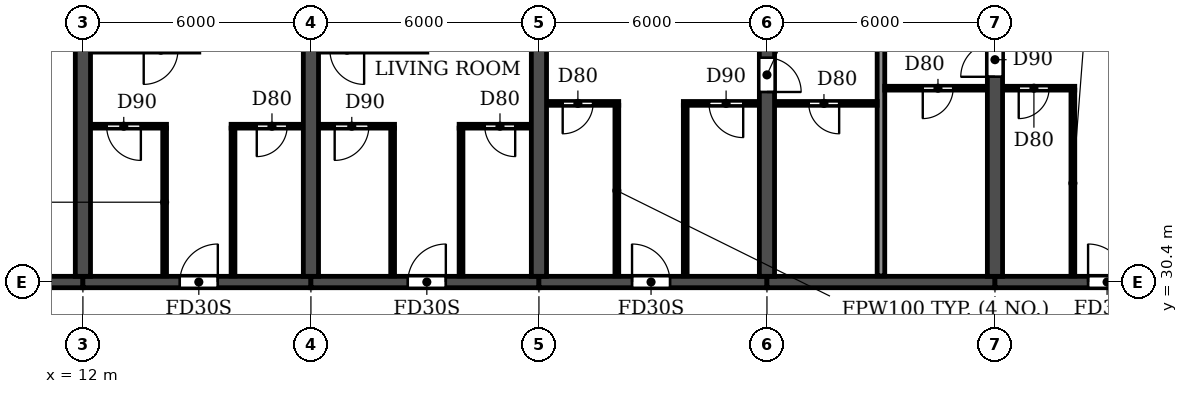
"""IFC4 building model, lengths in metres.
Left out: names, types, materials, properties, quantities, classifications, styles, units other than length and angle.
Written with IfcOpenShell. Run it as: python <this file> out.ifc"""

import sys

from ifc_helpers import new_model, si_unit, direction, frame, frame_2d, origin, place, context, subcontext, project, spatial, rectangle, extrude, element, fill, save


model = new_model("IFC4")
c1 = context("Model", 3, precision=1e-05, world=origin(), true_north=direction((0.0, 1.0)))
c2 = subcontext(c1, "Body", "Model", "MODEL_VIEW")
j1 = project(units=[si_unit("LENGTHUNIT", "METRE"), si_unit("PLANEANGLEUNIT", "RADIAN")], contexts=[c1])
p1 = place(None, origin())
s1 = spatial("IfcSite", under=j1, at=p1, CompositionType="ELEMENT")
p2 = place(p1, origin())
s2 = spatial("IfcBuilding", under=s1, at=p2, CompositionType="ELEMENT")
p3 = place(p2, frame((0.0, 0.0, 63.0)))
s3 = spatial("IfcBuildingStorey", under=s2, at=p3, CompositionType="ELEMENT", Elevation=63.0)
for number, where, z_axis, x_axis in (
    (1, (12.0, 30.55, 0.0), (0.0, 0.0, 1.0), (0.0, 1.0, 0.0)),
    (2, (18.0, 30.55, 0.0), (0.0, 0.0, 1.0), (0.0, 1.0, 0.0)),
    (3, (24.0, 30.55, 0.0), (0.0, 0.0, 1.0), (0.0, 1.0, 0.0)),
):
    element("IfcWall", number, at=place(p3, frame(where, z_axis=z_axis, x_axis=x_axis)), inside=s3, PredefinedType="SHEAR", context=c2, shape_type="SweptSolid", body=[
        extrude(rectangle(XDim=14.05, YDim=0.4, at=frame_2d((7.025, 0.0))), origin(), (0.0, 0.0, 1.0), 2.95),
    ])
p4 = place(p3, frame((30.0, 30.55, 0.0), z_axis=(0.0, 0.0, 1.0), x_axis=(0.0, 1.0, 0.0)))
e4 = element("IfcWall", 4, at=p4, inside=s3, PredefinedType="SHEAR", context=c2, shape_type="SweptSolid", body=[
    extrude(rectangle(XDim=14.05, YDim=0.4, at=frame_2d((7.025, 0.0))), origin(), (0.0, 0.0, 1.0), 2.95),
])
p5 = place(p4, frame((4.85, 0.0, 0.0)))
e5 = element("IfcOpeningElement", 5, at=p5, cuts=e4, PredefinedType="OPENING", context=c2, shape_type="SweptSolid", body=[
    extrude(rectangle(XDim=0.9, YDim=2.1, at=frame_2d((0.45, 1.05))), frame((0.0, 0.21, 0.0), z_axis=(0.0, -1.0, 0.0), x_axis=(1.0, 0.0, 0.0)), (0.0, 0.0, 1.0), 0.42),
])
p6 = place(p3, frame((36.0, 30.55, 0.0), z_axis=(0.0, 0.0, 1.0), x_axis=(0.0, 1.0, 0.0)))
e6 = element("IfcWall", 6, at=p6, inside=s3, PredefinedType="SHEAR", context=c2, shape_type="SweptSolid", body=[
    extrude(rectangle(XDim=14.05, YDim=0.4, at=frame_2d((7.025, 0.0))), origin(), (0.0, 0.0, 1.0), 2.95),
])
p7 = place(p6, frame((5.25, 0.0, 0.0)))
e7 = element("IfcOpeningElement", 7, at=p7, cuts=e6, PredefinedType="OPENING", context=c2, shape_type="SweptSolid", body=[
    extrude(rectangle(XDim=0.9, YDim=2.1, at=frame_2d((0.45, 1.05))), frame((0.0, 0.21, 0.0), z_axis=(0.0, -1.0, 0.0), x_axis=(1.0, 0.0, 0.0)), (0.0, 0.0, 1.0), 0.42),
])
p8 = place(p3, frame((6.2, 30.4, 0.0), z_axis=(0.0, 0.0, 1.0), x_axis=(1.0, 0.0, 0.0)))
e8 = element("IfcWall", 8, at=p8, inside=s3, PredefinedType="SHEAR", context=c2, shape_type="SweptSolid", body=[
    extrude(rectangle(XDim=5.8, YDim=0.3, at=frame_2d((2.9, 0.0))), origin(), (0.0, 0.0, 1.0), 2.35),
])
p9 = place(p8, frame((2.3, 0.0, 0.0)))
e9 = element("IfcOpeningElement", 9, at=p9, cuts=e8, PredefinedType="OPENING", context=c2, shape_type="SweptSolid", body=[
    extrude(rectangle(XDim=1.0, YDim=2.1, at=frame_2d((0.5, 1.05))), frame((0.0, 0.16, 0.0), z_axis=(0.0, -1.0, 0.0), x_axis=(1.0, 0.0, 0.0)), (0.0, 0.0, 1.0), 0.32),
])
p10 = place(p3, frame((12.0, 30.4, 0.0), z_axis=(0.0, 0.0, 1.0), x_axis=(1.0, 0.0, 0.0)))
e10 = element("IfcWall", 10, at=p10, inside=s3, PredefinedType="SHEAR", context=c2, shape_type="SweptSolid", body=[
    extrude(rectangle(XDim=6.0, YDim=0.3, at=frame_2d((3.0, 0.0))), origin(), (0.0, 0.0, 1.0), 2.35),
])
p11 = place(p10, frame((2.55, 0.0, 0.0)))
e11 = element("IfcOpeningElement", 11, at=p11, cuts=e10, PredefinedType="OPENING", context=c2, shape_type="SweptSolid", body=[
    extrude(rectangle(XDim=1.0, YDim=2.1, at=frame_2d((0.5, 1.05))), frame((0.0, 0.16, 0.0), z_axis=(0.0, -1.0, 0.0), x_axis=(1.0, 0.0, 0.0)), (0.0, 0.0, 1.0), 0.32),
])
p12 = place(p3, frame((18.0, 30.4, 0.0), z_axis=(0.0, 0.0, 1.0), x_axis=(1.0, 0.0, 0.0)))
e12 = element("IfcWall", 12, at=p12, inside=s3, PredefinedType="SHEAR", context=c2, shape_type="SweptSolid", body=[
    extrude(rectangle(XDim=6.0, YDim=0.3, at=frame_2d((3.0, 0.0))), origin(), (0.0, 0.0, 1.0), 2.35),
])
p13 = place(p12, frame((2.55, 0.0, 0.0)))
e13 = element("IfcOpeningElement", 13, at=p13, cuts=e12, PredefinedType="OPENING", context=c2, shape_type="SweptSolid", body=[
    extrude(rectangle(XDim=1.0, YDim=2.1, at=frame_2d((0.5, 1.05))), frame((0.0, 0.16, 0.0), z_axis=(0.0, -1.0, 0.0), x_axis=(1.0, 0.0, 0.0)), (0.0, 0.0, 1.0), 0.32),
])
p14 = place(p3, frame((24.0, 30.4, 0.0), z_axis=(0.0, 0.0, 1.0), x_axis=(1.0, 0.0, 0.0)))
e14 = element("IfcWall", 14, at=p14, inside=s3, PredefinedType="SHEAR", context=c2, shape_type="SweptSolid", body=[
    extrude(rectangle(XDim=6.0, YDim=0.3, at=frame_2d((3.0, 0.0))), origin(), (0.0, 0.0, 1.0), 2.35),
])
p15 = place(p14, frame((2.45, 0.0, 0.0)))
e15 = element("IfcOpeningElement", 15, at=p15, cuts=e14, PredefinedType="OPENING", context=c2, shape_type="SweptSolid", body=[
    extrude(rectangle(XDim=1.0, YDim=2.1, at=frame_2d((0.5, 1.05))), frame((0.0, 0.16, 0.0), z_axis=(0.0, -1.0, 0.0), x_axis=(1.0, 0.0, 0.0)), (0.0, 0.0, 1.0), 0.32),
])
p16 = place(p3, frame((30.0, 30.4, 0.0), z_axis=(0.0, 0.0, 1.0), x_axis=(1.0, 0.0, 0.0)))
e16 = element("IfcWall", 16, at=p16, inside=s3, PredefinedType="SHEAR", context=c2, shape_type="SweptSolid", body=[
    extrude(rectangle(XDim=6.0, YDim=0.3, at=frame_2d((3.0, 0.0))), origin(), (0.0, 0.0, 1.0), 2.35),
])
p17 = place(p3, frame((36.0, 30.4, 0.0), z_axis=(0.0, 0.0, 1.0), x_axis=(1.0, 0.0, 0.0)))
e17 = element("IfcWall", 17, at=p17, inside=s3, PredefinedType="SHEAR", context=c2, shape_type="SweptSolid", body=[
    extrude(rectangle(XDim=6.0, YDim=0.3, at=frame_2d((3.0, 0.0))), origin(), (0.0, 0.0, 1.0), 2.35),
])
p18 = place(p17, frame((2.45, 0.0, 0.0)))
e18 = element("IfcOpeningElement", 18, at=p18, cuts=e17, PredefinedType="OPENING", context=c2, shape_type="SweptSolid", body=[
    extrude(rectangle(XDim=1.0, YDim=2.1, at=frame_2d((0.5, 1.05))), frame((0.0, 0.16, 0.0), z_axis=(0.0, -1.0, 0.0), x_axis=(1.0, 0.0, 0.0)), (0.0, 0.0, 1.0), 0.32),
])
p19 = place(p3, frame((33.0, 30.56, 0.0), z_axis=(0.0, 0.0, 1.0), x_axis=(0.0, 1.0, 0.0)))
e19 = element("IfcWall", 19, at=p19, inside=s3, PredefinedType="PARTITIONING", context=c2, shape_type="SweptSolid", body=[
    extrude(rectangle(XDim=14.18, YDim=0.2, at=frame_2d((7.09, 0.0))), origin(), (0.0, 0.0, 1.0), 2.95),
])
p20 = place(p3, frame((12.21, 34.5, 0.0), z_axis=(0.0, 0.0, 1.0), x_axis=(1.0, 0.0, 0.0)))
e20 = element("IfcWall", 20, at=p20, inside=s3, PredefinedType="PARTITIONING", context=c2, shape_type="SweptSolid", body=[
    extrude(rectangle(XDim=1.99, YDim=0.1, at=frame_2d((0.995, 0.0))), origin(), (0.0, 0.0, 1.0), 2.95),
])
p21 = place(p20, frame((0.415, 0.0, 0.0)))
e21 = element("IfcOpeningElement", 21, at=p21, cuts=e20, PredefinedType="OPENING", context=c2, shape_type="SweptSolid", body=[
    extrude(rectangle(XDim=0.9, YDim=2.1, at=frame_2d((0.45, 1.05))), frame((0.0, 0.06, 0.0), z_axis=(0.0, -1.0, 0.0), x_axis=(1.0, 0.0, 0.0)), (0.0, 0.0, 1.0), 0.12),
])
p22 = place(p3, frame((15.9, 34.5, 0.0), z_axis=(0.0, 0.0, 1.0), x_axis=(1.0, 0.0, 0.0)))
e22 = element("IfcWall", 22, at=p22, inside=s3, PredefinedType="PARTITIONING", context=c2, shape_type="SweptSolid", body=[
    extrude(rectangle(XDim=1.89, YDim=0.1, at=frame_2d((0.945, 0.0))), origin(), (0.0, 0.0, 1.0), 2.95),
])
p23 = place(p22, frame((0.675, 0.0, 0.0)))
e23 = element("IfcOpeningElement", 23, at=p23, cuts=e22, PredefinedType="OPENING", context=c2, shape_type="SweptSolid", body=[
    extrude(rectangle(XDim=0.8, YDim=2.1, at=frame_2d((0.4, 1.05))), frame((0.0, 0.06, 0.0), z_axis=(0.0, -1.0, 0.0), x_axis=(1.0, 0.0, 0.0)), (0.0, 0.0, 1.0), 0.12),
])
p24 = place(p3, frame((18.21, 34.5, 0.0), z_axis=(0.0, 0.0, 1.0), x_axis=(1.0, 0.0, 0.0)))
e24 = element("IfcWall", 24, at=p24, inside=s3, PredefinedType="PARTITIONING", context=c2, shape_type="SweptSolid", body=[
    extrude(rectangle(XDim=1.99, YDim=0.1, at=frame_2d((0.995, 0.0))), origin(), (0.0, 0.0, 1.0), 2.95),
])
p25 = place(p24, frame((0.415, 0.0, 0.0)))
e25 = element("IfcOpeningElement", 25, at=p25, cuts=e24, PredefinedType="OPENING", context=c2, shape_type="SweptSolid", body=[
    extrude(rectangle(XDim=0.9, YDim=2.1, at=frame_2d((0.45, 1.05))), frame((0.0, 0.06, 0.0), z_axis=(0.0, -1.0, 0.0), x_axis=(1.0, 0.0, 0.0)), (0.0, 0.0, 1.0), 0.12),
])
p26 = place(p3, frame((21.9, 34.5, 0.0), z_axis=(0.0, 0.0, 1.0), x_axis=(1.0, 0.0, 0.0)))
e26 = element("IfcWall", 26, at=p26, inside=s3, PredefinedType="PARTITIONING", context=c2, shape_type="SweptSolid", body=[
    extrude(rectangle(XDim=1.89, YDim=0.1, at=frame_2d((0.945, 0.0))), origin(), (0.0, 0.0, 1.0), 2.95),
])
p27 = place(p26, frame((0.675, 0.0, 0.0)))
e27 = element("IfcOpeningElement", 27, at=p27, cuts=e26, PredefinedType="OPENING", context=c2, shape_type="SweptSolid", body=[
    extrude(rectangle(XDim=0.8, YDim=2.1, at=frame_2d((0.4, 1.05))), frame((0.0, 0.06, 0.0), z_axis=(0.0, -1.0, 0.0), x_axis=(1.0, 0.0, 0.0)), (0.0, 0.0, 1.0), 0.12),
])
p28 = place(p3, frame((24.21, 35.1, 0.0), z_axis=(0.0, 0.0, 1.0), x_axis=(1.0, 0.0, 0.0)))
e28 = element("IfcWall", 28, at=p28, inside=s3, PredefinedType="PARTITIONING", context=c2, shape_type="SweptSolid", body=[
    extrude(rectangle(XDim=1.89, YDim=0.1, at=frame_2d((0.945, 0.0))), origin(), (0.0, 0.0, 1.0), 2.95),
])
p29 = place(p28, frame((0.415, 0.0, 0.0)))
e29 = element("IfcOpeningElement", 29, at=p29, cuts=e28, PredefinedType="OPENING", context=c2, shape_type="SweptSolid", body=[
    extrude(rectangle(XDim=0.8, YDim=2.1, at=frame_2d((0.4, 1.05))), frame((0.0, 0.06, 0.0), z_axis=(0.0, -1.0, 0.0), x_axis=(1.0, 0.0, 0.0)), (0.0, 0.0, 1.0), 0.12),
])
p30 = place(p3, frame((27.8, 35.1, 0.0), z_axis=(0.0, 0.0, 1.0), x_axis=(1.0, 0.0, 0.0)))
e30 = element("IfcWall", 30, at=p30, inside=s3, PredefinedType="PARTITIONING", context=c2, shape_type="SweptSolid", body=[
    extrude(rectangle(XDim=1.99, YDim=0.1, at=frame_2d((0.995, 0.0))), origin(), (0.0, 0.0, 1.0), 2.95),
])
p31 = place(p30, frame((0.675, 0.0, 0.0)))
e31 = element("IfcOpeningElement", 31, at=p31, cuts=e30, PredefinedType="OPENING", context=c2, shape_type="SweptSolid", body=[
    extrude(rectangle(XDim=0.9, YDim=2.1, at=frame_2d((0.45, 1.05))), frame((0.0, 0.06, 0.0), z_axis=(0.0, -1.0, 0.0), x_axis=(1.0, 0.0, 0.0)), (0.0, 0.0, 1.0), 0.12),
])
p32 = place(p3, frame((30.21, 35.1, 0.0), z_axis=(0.0, 0.0, 1.0), x_axis=(1.0, 0.0, 0.0)))
e32 = element("IfcWall", 32, at=p32, inside=s3, PredefinedType="PARTITIONING", context=c2, shape_type="SweptSolid", body=[
    extrude(rectangle(XDim=2.69, YDim=0.1, at=frame_2d((1.345, 0.0))), origin(), (0.0, 0.0, 1.0), 2.95),
])
p33 = place(p32, frame((0.89, 0.0, 0.0)))
e33 = element("IfcOpeningElement", 33, at=p33, cuts=e32, PredefinedType="OPENING", context=c2, shape_type="SweptSolid", body=[
    extrude(rectangle(XDim=0.8, YDim=2.1, at=frame_2d((0.4, 1.05))), frame((0.0, 0.06, 0.0), z_axis=(0.0, -1.0, 0.0), x_axis=(1.0, 0.0, 0.0)), (0.0, 0.0, 1.0), 0.12),
])
p34 = place(p3, frame((33.1, 35.5, 0.0), z_axis=(0.0, 0.0, 1.0), x_axis=(1.0, 0.0, 0.0)))
e34 = element("IfcWall", 34, at=p34, inside=s3, PredefinedType="PARTITIONING", context=c2, shape_type="SweptSolid", body=[
    extrude(rectangle(XDim=2.69, YDim=0.1, at=frame_2d((1.345, 0.0))), origin(), (0.0, 0.0, 1.0), 2.95),
])
p35 = place(p34, frame((1.0, 0.0, 0.0)))
e35 = element("IfcOpeningElement", 35, at=p35, cuts=e34, PredefinedType="OPENING", context=c2, shape_type="SweptSolid", body=[
    extrude(rectangle(XDim=0.8, YDim=2.1, at=frame_2d((0.4, 1.05))), frame((0.0, 0.06, 0.0), z_axis=(0.0, -1.0, 0.0), x_axis=(1.0, 0.0, 0.0)), (0.0, 0.0, 1.0), 0.12),
])
p36 = place(p3, frame((36.21, 35.5, 0.0), z_axis=(0.0, 0.0, 1.0), x_axis=(1.0, 0.0, 0.0)))
e36 = element("IfcWall", 36, at=p36, inside=s3, PredefinedType="PARTITIONING", context=c2, shape_type="SweptSolid", body=[
    extrude(rectangle(XDim=1.89, YDim=0.1, at=frame_2d((0.945, 0.0))), origin(), (0.0, 0.0, 1.0), 2.95),
])
p37 = place(p36, frame((0.415, 0.0, 0.0)))
e37 = element("IfcOpeningElement", 37, at=p37, cuts=e36, PredefinedType="OPENING", context=c2, shape_type="SweptSolid", body=[
    extrude(rectangle(XDim=0.8, YDim=2.1, at=frame_2d((0.4, 1.05))), frame((0.0, 0.06, 0.0), z_axis=(0.0, -1.0, 0.0), x_axis=(1.0, 0.0, 0.0)), (0.0, 0.0, 1.0), 0.12),
])
for number, where, z_axis, x_axis in (
    (38, (14.15, 30.56, 0.0), (0.0, 0.0, 1.0), (0.0, 1.0, 0.0)),
    (39, (15.95, 30.56, 0.0), (0.0, 0.0, 1.0), (0.0, 1.0, 0.0)),
    (40, (20.15, 30.56, 0.0), (0.0, 0.0, 1.0), (0.0, 1.0, 0.0)),
    (41, (21.95, 30.56, 0.0), (0.0, 0.0, 1.0), (0.0, 1.0, 0.0)),
):
    element("IfcWall", number, at=place(p3, frame(where, z_axis=z_axis, x_axis=x_axis)), inside=s3, PredefinedType="PARTITIONING", context=c2, shape_type="SweptSolid", body=[
        extrude(rectangle(XDim=3.89, YDim=0.1, at=frame_2d((1.945, 0.0))), origin(), (0.0, 0.0, 1.0), 2.95),
    ])
for number, where, z_axis, x_axis in (
    (42, (26.05, 30.56, 0.0), (0.0, 0.0, 1.0), (0.0, 1.0, 0.0)),
    (43, (27.85, 30.56, 0.0), (0.0, 0.0, 1.0), (0.0, 1.0, 0.0)),
):
    element("IfcWall", number, at=place(p3, frame(where, z_axis=z_axis, x_axis=x_axis)), inside=s3, PredefinedType="PARTITIONING", context=c2, shape_type="SweptSolid", body=[
        extrude(rectangle(XDim=4.49, YDim=0.1, at=frame_2d((2.245, 0.0))), origin(), (0.0, 0.0, 1.0), 2.95),
    ])
p38 = place(p3, frame((38.05, 30.56, 0.0), z_axis=(0.0, 0.0, 1.0), x_axis=(0.0, 1.0, 0.0)))
e44 = element("IfcWall", 44, at=p38, inside=s3, PredefinedType="PARTITIONING", context=c2, shape_type="SweptSolid", body=[
    extrude(rectangle(XDim=4.89, YDim=0.1, at=frame_2d((2.445, 0.0))), origin(), (0.0, 0.0, 1.0), 2.95),
])
p39 = place(p21, frame((0.9, 0.0, 0.0), z_axis=(0.0, 0.0, 1.0), x_axis=(-1.0, 0.0, 0.0)))
e45 = element("IfcDoor", 45, at=p39, inside=s3, OperationType="SINGLE_SWING_LEFT", PredefinedType="DOOR", context=c2, shape_type="SweptSolid", body=[
    extrude(rectangle(XDim=0.9, YDim=2.1, at=frame_2d((0.45, 1.05))), frame((0.0, 0.025, 0.0), z_axis=(0.0, -1.0, 0.0), x_axis=(1.0, 0.0, 0.0)), (0.0, 0.0, 1.0), 0.05),
])
fill(e21, e45)
p40 = place(p11, origin())
e46 = element("IfcDoor", 46, at=p40, inside=s3, OperationType="SINGLE_SWING_RIGHT", PredefinedType="DOOR", context=c2, shape_type="SweptSolid", body=[
    extrude(rectangle(XDim=1.0, YDim=2.1, at=frame_2d((0.5, 1.05))), frame((0.0, 0.025, 0.0), z_axis=(0.0, -1.0, 0.0), x_axis=(1.0, 0.0, 0.0)), (0.0, 0.0, 1.0), 0.05),
])
fill(e11, e46)
p41 = place(p23, frame((0.8, 0.0, 0.0), z_axis=(0.0, 0.0, 1.0), x_axis=(-1.0, 0.0, 0.0)))
e47 = element("IfcDoor", 47, at=p41, inside=s3, OperationType="SINGLE_SWING_RIGHT", PredefinedType="DOOR", context=c2, shape_type="SweptSolid", body=[
    extrude(rectangle(XDim=0.8, YDim=2.1, at=frame_2d((0.4, 1.05))), frame((0.0, 0.025, 0.0), z_axis=(0.0, -1.0, 0.0), x_axis=(1.0, 0.0, 0.0)), (0.0, 0.0, 1.0), 0.05),
])
fill(e23, e47)
p42 = place(p25, frame((0.9, 0.0, 0.0), z_axis=(0.0, 0.0, 1.0), x_axis=(-1.0, 0.0, 0.0)))
e48 = element("IfcDoor", 48, at=p42, inside=s3, OperationType="SINGLE_SWING_RIGHT", PredefinedType="DOOR", context=c2, shape_type="SweptSolid", body=[
    extrude(rectangle(XDim=0.9, YDim=2.1, at=frame_2d((0.45, 1.05))), frame((0.0, 0.025, 0.0), z_axis=(0.0, -1.0, 0.0), x_axis=(1.0, 0.0, 0.0)), (0.0, 0.0, 1.0), 0.05),
])
fill(e25, e48)
p43 = place(p13, origin())
e49 = element("IfcDoor", 49, at=p43, inside=s3, OperationType="SINGLE_SWING_RIGHT", PredefinedType="DOOR", context=c2, shape_type="SweptSolid", body=[
    extrude(rectangle(XDim=1.0, YDim=2.1, at=frame_2d((0.5, 1.05))), frame((0.0, 0.025, 0.0), z_axis=(0.0, -1.0, 0.0), x_axis=(1.0, 0.0, 0.0)), (0.0, 0.0, 1.0), 0.05),
])
fill(e13, e49)
p44 = place(p27, frame((0.8, 0.0, 0.0), z_axis=(0.0, 0.0, 1.0), x_axis=(-1.0, 0.0, 0.0)))
e50 = element("IfcDoor", 50, at=p44, inside=s3, OperationType="SINGLE_SWING_LEFT", PredefinedType="DOOR", context=c2, shape_type="SweptSolid", body=[
    extrude(rectangle(XDim=0.8, YDim=2.1, at=frame_2d((0.4, 1.05))), frame((0.0, 0.025, 0.0), z_axis=(0.0, -1.0, 0.0), x_axis=(1.0, 0.0, 0.0)), (0.0, 0.0, 1.0), 0.05),
])
fill(e27, e50)
p45 = place(p33, frame((0.8, 0.0, 0.0), z_axis=(0.0, 0.0, 1.0), x_axis=(-1.0, 0.0, 0.0)))
e51 = element("IfcDoor", 51, at=p45, inside=s3, OperationType="SINGLE_SWING_LEFT", PredefinedType="DOOR", context=c2, shape_type="SweptSolid", body=[
    extrude(rectangle(XDim=0.8, YDim=2.1, at=frame_2d((0.4, 1.05))), frame((0.0, 0.025, 0.0), z_axis=(0.0, -1.0, 0.0), x_axis=(1.0, 0.0, 0.0)), (0.0, 0.0, 1.0), 0.05),
])
fill(e33, e51)
p46 = place(p29, frame((0.8, 0.0, 0.0), z_axis=(0.0, 0.0, 1.0), x_axis=(-1.0, 0.0, 0.0)))
e52 = element("IfcDoor", 52, at=p46, inside=s3, OperationType="SINGLE_SWING_RIGHT", PredefinedType="DOOR", context=c2, shape_type="SweptSolid", body=[
    extrude(rectangle(XDim=0.8, YDim=2.1, at=frame_2d((0.4, 1.05))), frame((0.0, 0.025, 0.0), z_axis=(0.0, -1.0, 0.0), x_axis=(1.0, 0.0, 0.0)), (0.0, 0.0, 1.0), 0.05),
])
fill(e29, e52)
p47 = place(p15, origin())
e53 = element("IfcDoor", 53, at=p47, inside=s3, OperationType="SINGLE_SWING_LEFT", PredefinedType="DOOR", context=c2, shape_type="SweptSolid", body=[
    extrude(rectangle(XDim=1.0, YDim=2.1, at=frame_2d((0.5, 1.05))), frame((0.0, 0.025, 0.0), z_axis=(0.0, -1.0, 0.0), x_axis=(1.0, 0.0, 0.0)), (0.0, 0.0, 1.0), 0.05),
])
fill(e15, e53)
p48 = place(p31, frame((0.9, 0.0, 0.0), z_axis=(0.0, 0.0, 1.0), x_axis=(-1.0, 0.0, 0.0)))
e54 = element("IfcDoor", 54, at=p48, inside=s3, OperationType="SINGLE_SWING_LEFT", PredefinedType="DOOR", context=c2, shape_type="SweptSolid", body=[
    extrude(rectangle(XDim=0.9, YDim=2.1, at=frame_2d((0.45, 1.05))), frame((0.0, 0.025, 0.0), z_axis=(0.0, -1.0, 0.0), x_axis=(1.0, 0.0, 0.0)), (0.0, 0.0, 1.0), 0.05),
])
fill(e31, e54)
p49 = place(p5, frame((0.9, 0.0, 0.0), z_axis=(0.0, 0.0, 1.0), x_axis=(-1.0, 0.0, 0.0)))
e55 = element("IfcDoor", 55, at=p49, inside=s3, OperationType="SINGLE_SWING_RIGHT", PredefinedType="DOOR", context=c2, shape_type="SweptSolid", body=[
    extrude(rectangle(XDim=0.9, YDim=2.1, at=frame_2d((0.45, 1.05))), frame((0.0, 0.025, 0.0), z_axis=(0.0, -1.0, 0.0), x_axis=(1.0, 0.0, 0.0)), (0.0, 0.0, 1.0), 0.05),
])
fill(e5, e55)
p50 = place(p35, frame((0.8, 0.0, 0.0), z_axis=(0.0, 0.0, 1.0), x_axis=(-1.0, 0.0, 0.0)))
e56 = element("IfcDoor", 56, at=p50, inside=s3, OperationType="SINGLE_SWING_RIGHT", PredefinedType="DOOR", context=c2, shape_type="SweptSolid", body=[
    extrude(rectangle(XDim=0.8, YDim=2.1, at=frame_2d((0.4, 1.05))), frame((0.0, 0.025, 0.0), z_axis=(0.0, -1.0, 0.0), x_axis=(1.0, 0.0, 0.0)), (0.0, 0.0, 1.0), 0.05),
])
fill(e35, e56)
p51 = place(p7, origin())
e57 = element("IfcDoor", 57, at=p51, inside=s3, OperationType="SINGLE_SWING_LEFT", PredefinedType="DOOR", context=c2, shape_type="SweptSolid", body=[
    extrude(rectangle(XDim=0.9, YDim=2.1, at=frame_2d((0.45, 1.05))), frame((0.0, 0.025, 0.0), z_axis=(0.0, -1.0, 0.0), x_axis=(1.0, 0.0, 0.0)), (0.0, 0.0, 1.0), 0.05),
])
fill(e7, e57)
p52 = place(p37, frame((0.8, 0.0, 0.0), z_axis=(0.0, 0.0, 1.0), x_axis=(-1.0, 0.0, 0.0)))
e58 = element("IfcDoor", 58, at=p52, inside=s3, OperationType="SINGLE_SWING_RIGHT", PredefinedType="DOOR", context=c2, shape_type="SweptSolid", body=[
    extrude(rectangle(XDim=0.8, YDim=2.1, at=frame_2d((0.4, 1.05))), frame((0.0, 0.025, 0.0), z_axis=(0.0, -1.0, 0.0), x_axis=(1.0, 0.0, 0.0)), (0.0, 0.0, 1.0), 0.05),
])
fill(e37, e58)
p53 = place(p18, origin())
e59 = element("IfcDoor", 59, at=p53, inside=s3, OperationType="SINGLE_SWING_LEFT", PredefinedType="DOOR", context=c2, shape_type="SweptSolid", body=[
    extrude(rectangle(XDim=1.0, YDim=2.1, at=frame_2d((0.5, 1.05))), frame((0.0, 0.025, 0.0), z_axis=(0.0, -1.0, 0.0), x_axis=(1.0, 0.0, 0.0)), (0.0, 0.0, 1.0), 0.05),
])
fill(e18, e59)
save(model, sys.argv[1])
